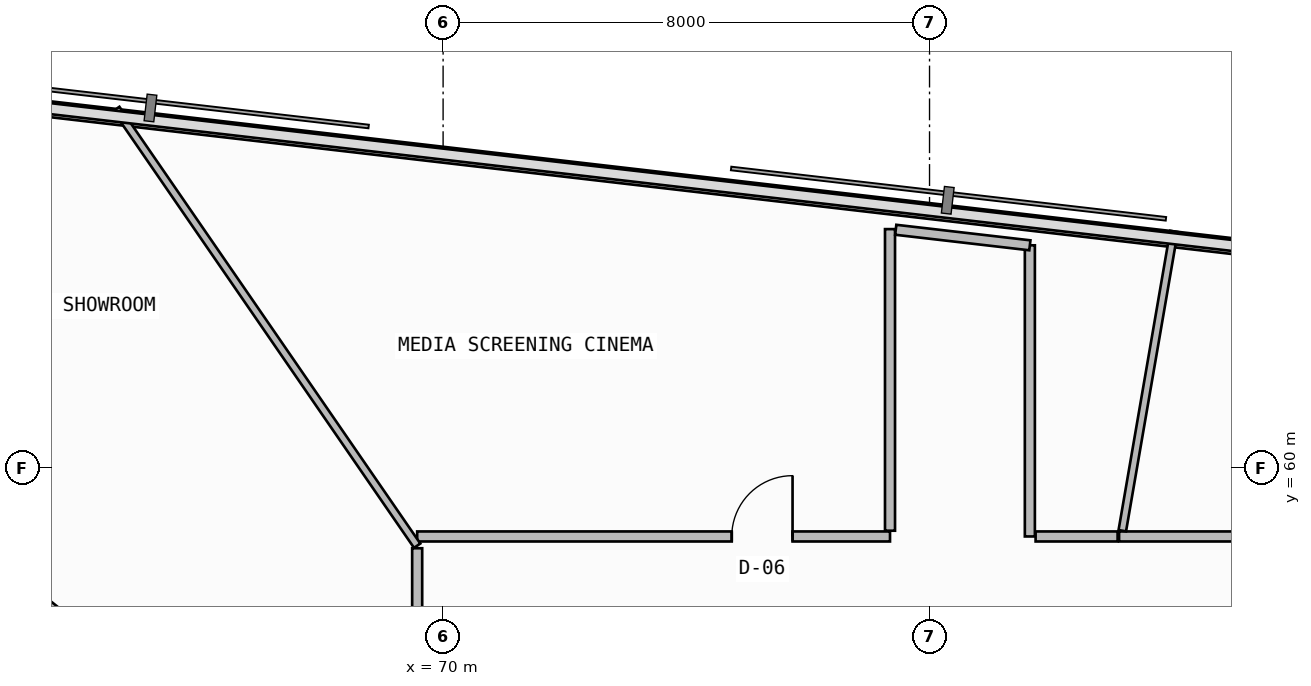
"""IFC4 building model, lengths in metres.
Left out: names, types, materials, properties, quantities, classifications, styles, units other than length and angle.
Written with IfcOpenShell. Run it as: python <this file> out.ifc"""

import sys

from ifc_helpers import new_model, si_unit, direction, frame, frame_2d, origin, place, context, subcontext, project, spatial, rectangle, extrude, element, fill, save


model = new_model("IFC4")
c1 = context("Model", 3, precision=1e-05, world=origin(), true_north=direction((0.0, 1.0)))
c2 = subcontext(c1, "Body", "Model", "MODEL_VIEW")
j1 = project(units=[si_unit("LENGTHUNIT", "METRE"), si_unit("PLANEANGLEUNIT", "RADIAN")], contexts=[c1])
p1 = place(None, origin())
s1 = spatial("IfcSite", under=j1, at=p1, CompositionType="ELEMENT")
p2 = place(p1, origin())
s2 = spatial("IfcBuilding", under=s1, at=p2, CompositionType="ELEMENT")
p3 = place(p2, frame((0.0, 0.0, 207.94)))
s3 = spatial("IfcBuildingStorey", under=s2, at=p3, CompositionType="ELEMENT", Elevation=207.94)
p4 = place(p3, frame((55.325, 59.57, -0.26), z_axis=(0.0, 0.0, 1.0), x_axis=(0.496211351597, -0.868201759124, 0.0)))
e1 = element("IfcWall", 1, at=p4, inside=s3, PredefinedType="SHEAR", context=c2, shape_type="SweptSolid", body=[
    extrude(rectangle(XDim=19.243, YDim=0.55, at=frame_2d((9.622, 0.0))), origin(), (0.0, 0.0, 1.0), 3.52),
])
p5 = place(p4, frame((7.757, 0.0, 1.1)))
e2 = element("IfcOpeningElement", 2, at=p5, cuts=e1, PredefinedType="OPENING", context=c2, shape_type="SweptSolid", body=[
    extrude(rectangle(XDim=2.4, YDim=1.2, at=frame_2d((1.2, 0.6))), frame((0.0, 0.285, 0.0), z_axis=(0.0, -1.0, 0.0), x_axis=(1.0, 0.0, 0.0)), (0.0, 0.0, 1.0), 0.57),
])
p6 = place(p3, frame((85.424, 63.338, 0.0), z_axis=(0.0, 0.0, 1.0), x_axis=(-0.993364714048, 0.115006716693, 0.0)))
e3 = element("IfcWall", 3, at=p6, inside=s3, PredefinedType="PARAPET", context=c2, shape_type="SweptSolid", body=[
    extrude(rectangle(XDim=26.302, YDim=0.2, at=frame_2d((13.151, 0.0))), origin(), (0.0, 0.0, 1.0), 1.15),
])
p7 = place(p3, frame((87.976, 58.876, 0.0), z_axis=(0.0, 0.0, 1.0), x_axis=(-1.0, 0.0, 0.0)))
e4 = element("IfcWall", 4, at=p7, inside=s3, PredefinedType="PARTITIONING", context=c2, shape_type="SweptSolid", body=[
    extrude(rectangle(XDim=6.859, YDim=0.165, at=frame_2d((3.43, 0.0))), origin(), (0.0, 0.0, 1.0), 2.745),
])
p8 = place(p3, frame((81.17, 58.971, 0.0), z_axis=(0.0, 0.0, 1.0), x_axis=(0.170173676804, 0.985414085409, 0.0)))
e5 = element("IfcWall", 5, at=p8, inside=s3, PredefinedType="PARTITIONING", context=c2, shape_type="SweptSolid", body=[
    extrude(rectangle(XDim=4.995, YDim=0.125, at=frame_2d((2.498, 0.0))), origin(), (0.0, 0.0, 1.0), 3.26),
])
p9 = place(p3, frame((77.35, 58.876, 0.0), z_axis=(0.0, 0.0, 1.0), x_axis=(-1.0, 0.0, 0.0)))
e6 = element("IfcWall", 6, at=p9, inside=s3, PredefinedType="PARTITIONING", context=c2, shape_type="SweptSolid", body=[
    extrude(rectangle(XDim=7.777, YDim=0.165, at=frame_2d((3.888, 0.0))), origin(), (0.0, 0.0, 1.0), 3.26),
])
p10 = place(p9, frame((1.603, 0.0, 0.0)))
e7 = element("IfcOpeningElement", 7, at=p10, cuts=e6, PredefinedType="OPENING", context=c2, shape_type="SweptSolid", body=[
    extrude(rectangle(XDim=1.0, YDim=2.2, at=frame_2d((0.5, 1.1))), frame((0.0, 0.093, 0.0), z_axis=(0.0, -1.0, 0.0), x_axis=(1.0, 0.0, 0.0)), (0.0, 0.0, 1.0), 0.185),
])
p11 = place(p3, frame((77.35, 63.931, 0.0), z_axis=(0.0, 0.0, 1.0), x_axis=(0.0, -1.0, 0.0)))
e8 = element("IfcWall", 8, at=p11, inside=s3, PredefinedType="PARTITIONING", context=c2, shape_type="SweptSolid", body=[
    extrude(rectangle(XDim=4.96, YDim=0.165, at=frame_2d((2.48, 0.0))), origin(), (0.0, 0.0, 1.0), 3.26),
])
p12 = place(p3, frame((79.65, 58.876, 0.0), z_axis=(0.0, 0.0, 1.0), x_axis=(0.0, 1.0, 0.0)))
e9 = element("IfcWall", 9, at=p12, inside=s3, PredefinedType="PARTITIONING", context=c2, shape_type="SweptSolid", body=[
    extrude(rectangle(XDim=4.788, YDim=0.165, at=frame_2d((2.394, 0.0))), origin(), (0.0, 0.0, 1.0), 3.26),
])
p13 = place(p3, frame((79.65, 63.665, 0.0), z_axis=(0.0, 0.0, 1.0), x_axis=(-0.993362136032, 0.115028981987, 0.0)))
e10 = element("IfcWall", 10, at=p13, inside=s3, PredefinedType="PARTITIONING", context=c2, shape_type="SweptSolid", body=[
    extrude(rectangle(XDim=2.22, YDim=0.165, at=frame_2d((1.11, 0.0))), origin(), (0.0, 0.0, 1.0), 3.26),
])
p14 = place(p3, frame((81.093, 58.876, 0.0), z_axis=(0.0, 0.0, 1.0), x_axis=(-1.0, 0.0, 0.0)))
e11 = element("IfcWall", 11, at=p14, inside=s3, PredefinedType="PARTITIONING", context=c2, shape_type="SweptSolid", body=[
    extrude(rectangle(XDim=1.349, YDim=0.165, at=frame_2d((0.674, 0.0))), origin(), (0.0, 0.0, 1.0), 3.26),
])
p15 = place(p3, frame((69.573, 58.724, 0.0), z_axis=(0.0, 0.0, 1.0), x_axis=(-0.567314937792, 0.823500917643, 0.0)))
e12 = element("IfcWall", 12, at=p15, inside=s3, PredefinedType="PARTITIONING", context=c2, shape_type="SweptSolid", body=[
    extrude(rectangle(XDim=8.723, YDim=0.125, at=frame_2d((4.361, 0.0))), origin(), (0.0, 0.0, 1.0), 3.26),
])
p16 = place(p3, frame((54.434, 65.029, 0.0), z_axis=(0.0, 0.0, 1.0), x_axis=(0.780535102031, -0.625111953572, 0.0)))
e13 = element("IfcWall", 13, at=p16, inside=s3, PredefinedType="PARTITIONING", context=c2, shape_type="SweptSolid", body=[
    extrude(rectangle(XDim=19.349, YDim=0.125, at=frame_2d((9.675, 0.0))), origin(), (0.0, 0.0, 1.0), 2.645),
])
p17 = place(p3, frame((69.573, 58.683, 0.0), z_axis=(0.0, 0.0, 1.0), x_axis=(0.0, -1.0, 0.0)))
e14 = element("IfcWall", 14, at=p17, inside=s3, PredefinedType="PARTITIONING", context=c2, shape_type="SweptSolid", body=[
    extrude(rectangle(XDim=5.683, YDim=0.165, at=frame_2d((2.842, 0.0))), origin(), (0.0, 0.0, 1.0), 2.745),
])
p18 = place(p17, frame((1.699, 0.0, 0.0)))
e15 = element("IfcOpeningElement", 15, at=p18, cuts=e14, PredefinedType="OPENING", context=c2, shape_type="SweptSolid", body=[
    extrude(rectangle(XDim=1.0, YDim=2.2, at=frame_2d((0.5, 1.1))), frame((0.0, 0.093, 0.0), z_axis=(0.0, -1.0, 0.0), x_axis=(1.0, 0.0, 0.0)), (0.0, 0.0, 1.0), 0.185),
])
p19 = place(p10, frame((1.0, 0.0, 0.0), z_axis=(0.0, 0.0, 1.0), x_axis=(-1.0, 0.0, 0.0)))
e16 = element("IfcDoor", 16, at=p19, inside=s3, OperationType="SINGLE_SWING_RIGHT", PredefinedType="DOOR", context=c2, shape_type="SweptSolid", body=[
    extrude(rectangle(XDim=1.0, YDim=2.2, at=frame_2d((0.5, 1.1))), frame((0.0, 0.025, 0.0), z_axis=(0.0, -1.0, 0.0), x_axis=(1.0, 0.0, 0.0)), (0.0, 0.0, 1.0), 0.05),
])
fill(e7, e16)
save(model, sys.argv[1])
